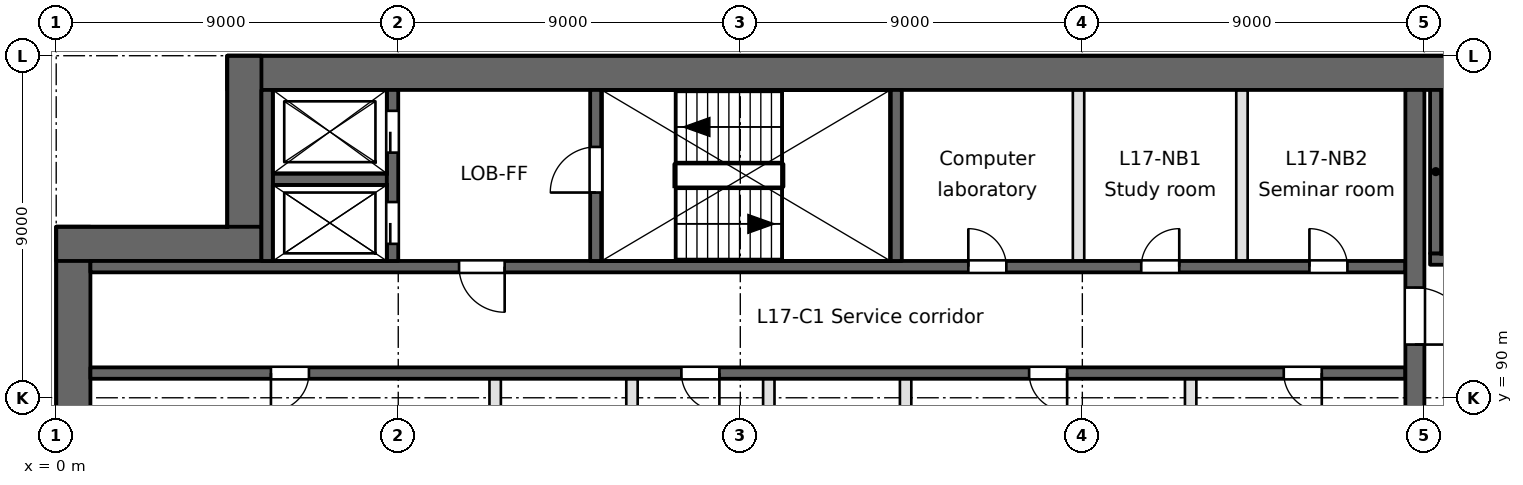
"""IFC4 building model, lengths in metres.
Left out: names, types, materials, properties, quantities, classifications, styles, units other than length and angle.
Written with IfcOpenShell. Run it as: python <this file> out.ifc"""

import sys

from ifc_helpers import new_model, si_unit, direction, frame, frame_2d, origin, place, context, subcontext, project, spatial, rectangle, extrude, element, fill, save


model = new_model("IFC4")
c1 = context("Model", 3, precision=1e-05, world=origin(), true_north=direction((0.0, 1.0)))
c2 = subcontext(c1, "Body", "Model", "MODEL_VIEW")
j1 = project(units=[si_unit("LENGTHUNIT", "METRE"), si_unit("PLANEANGLEUNIT", "RADIAN")], contexts=[c1])
p1 = place(None, origin())
s1 = spatial("IfcSite", under=j1, at=p1, CompositionType="ELEMENT")
p2 = place(p1, origin())
s2 = spatial("IfcBuilding", under=s1, at=p2, CompositionType="ELEMENT")
p3 = place(p2, frame((0.0, 0.0, 72.8)))
s3 = spatial("IfcBuildingStorey", under=s2, at=p3, CompositionType="ELEMENT", Elevation=72.8)
p4 = place(p3, frame((0.45, 94.5, 0.0), z_axis=(0.0, 0.0, 1.0), x_axis=(0.0, -1.0, 0.0)))
e1 = element("IfcWall", 1, at=p4, inside=s3, PredefinedType="SHEAR", context=c2, shape_type="SweptSolid", body=[
    extrude(rectangle(XDim=66.187, YDim=0.9, at=frame_2d((33.094, 0.0))), origin(), (0.0, 0.0, 1.0), 3.7),
])
p5 = place(p3, frame((94.5, 98.55, 0.0), z_axis=(0.0, 0.0, 1.0), x_axis=(-1.0, 0.0, 0.0)))
e2 = element("IfcWall", 2, at=p5, inside=s3, PredefinedType="SHEAR", context=c2, shape_type="SweptSolid", body=[
    extrude(rectangle(XDim=90.0, YDim=0.9, at=frame_2d((45.0, 0.0))), origin(), (0.0, 0.0, 1.0), 3.7),
])
for number, where, z_axis, x_axis in (
    (3, (4.95, 99.0, 0.0), (0.0, 0.0, 1.0), (0.0, -1.0, 0.0)),
    (4, (5.4, 94.05, 0.0), (0.0, 0.0, 1.0), (-1.0, 0.0, 0.0)),
):
    element("IfcWall", number, at=place(p3, frame(where, z_axis=z_axis, x_axis=x_axis)), inside=s3, PredefinedType="SHEAR", context=c2, shape_type="SweptSolid", body=[
        extrude(rectangle(XDim=5.4, YDim=0.9, at=frame_2d((2.7, 0.0))), origin(), (0.0, 0.0, 1.0), 3.7),
    ])
p6 = place(p3, frame((0.9, 90.65, -0.4), z_axis=(0.0, 0.0, 1.0), x_axis=(1.0, 0.0, 0.0)))
e5 = element("IfcWall", 5, at=p6, inside=s3, PredefinedType="SOLIDWALL", context=c2, shape_type="SweptSolid", body=[
    extrude(rectangle(XDim=34.6, YDim=0.3, at=frame_2d((17.3, 0.0))), origin(), (0.0, 0.0, 1.0), 3.7),
])
p7 = place(p6, frame((4.75, 0.0, 0.4)))
e6 = element("IfcOpeningElement", 6, at=p7, cuts=e5, PredefinedType="OPENING", context=c2, shape_type="SweptSolid", body=[
    extrude(rectangle(XDim=1.0, YDim=2.1, at=frame_2d((0.5, 1.05))), frame((0.0, 0.15, 0.0), z_axis=(0.0, -1.0, 0.0), x_axis=(1.0, 0.0, 0.0)), (0.0, 0.0, 1.0), 0.3),
])
p8 = place(p6, frame((24.7, 0.0, 0.4)))
e7 = element("IfcOpeningElement", 7, at=p8, cuts=e5, PredefinedType="OPENING", context=c2, shape_type="SweptSolid", body=[
    extrude(rectangle(XDim=1.0, YDim=2.1, at=frame_2d((0.5, 1.05))), frame((0.0, 0.15, 0.0), z_axis=(0.0, -1.0, 0.0), x_axis=(1.0, 0.0, 0.0)), (0.0, 0.0, 1.0), 0.3),
])
p9 = place(p6, frame((15.55, 0.0, 0.4)))
e8 = element("IfcOpeningElement", 8, at=p9, cuts=e5, PredefinedType="OPENING", context=c2, shape_type="SweptSolid", body=[
    extrude(rectangle(XDim=1.0, YDim=2.1, at=frame_2d((0.5, 1.05))), frame((0.0, 0.15, 0.0), z_axis=(0.0, -1.0, 0.0), x_axis=(1.0, 0.0, 0.0)), (0.0, 0.0, 1.0), 0.3),
])
p10 = place(p6, frame((31.4, 0.0, 0.4)))
e9 = element("IfcOpeningElement", 9, at=p10, cuts=e5, PredefinedType="OPENING", context=c2, shape_type="SweptSolid", body=[
    extrude(rectangle(XDim=1.0, YDim=2.1, at=frame_2d((0.5, 1.05))), frame((0.0, 0.15, 0.0), z_axis=(0.0, -1.0, 0.0), x_axis=(1.0, 0.0, 0.0)), (0.0, 0.0, 1.0), 0.3),
])
p11 = place(p3, frame((0.9, 93.45, -0.4), z_axis=(0.0, 0.0, 1.0), x_axis=(1.0, 0.0, 0.0)))
e10 = element("IfcWall", 10, at=p11, inside=s3, PredefinedType="SOLIDWALL", context=c2, shape_type="SweptSolid", body=[
    extrude(rectangle(XDim=34.6, YDim=0.3, at=frame_2d((17.3, 0.0))), origin(), (0.0, 0.0, 1.0), 3.7),
])
p12 = place(p11, frame((9.7, 0.0, 0.4)))
e11 = element("IfcOpeningElement", 11, at=p12, cuts=e10, PredefinedType="OPENING", context=c2, shape_type="SweptSolid", body=[
    extrude(rectangle(XDim=1.2, YDim=2.1, at=frame_2d((0.6, 1.05))), frame((0.0, 0.15, 0.0), z_axis=(0.0, -1.0, 0.0), x_axis=(1.0, 0.0, 0.0)), (0.0, 0.0, 1.0), 0.3),
])
p13 = place(p11, frame((23.1, 0.0, 0.4)))
e12 = element("IfcOpeningElement", 12, at=p13, cuts=e10, PredefinedType="OPENING", context=c2, shape_type="SweptSolid", body=[
    extrude(rectangle(XDim=1.0, YDim=2.1, at=frame_2d((0.5, 1.05))), frame((0.0, 0.15, 0.0), z_axis=(0.0, -1.0, 0.0), x_axis=(1.0, 0.0, 0.0)), (0.0, 0.0, 1.0), 0.3),
])
p14 = place(p11, frame((27.65, 0.0, 0.4)))
e13 = element("IfcOpeningElement", 13, at=p14, cuts=e10, PredefinedType="OPENING", context=c2, shape_type="SweptSolid", body=[
    extrude(rectangle(XDim=1.0, YDim=2.1, at=frame_2d((0.5, 1.05))), frame((0.0, 0.15, 0.0), z_axis=(0.0, -1.0, 0.0), x_axis=(1.0, 0.0, 0.0)), (0.0, 0.0, 1.0), 0.3),
])
p15 = place(p11, frame((32.075, 0.0, 0.4)))
e14 = element("IfcOpeningElement", 14, at=p15, cuts=e10, PredefinedType="OPENING", context=c2, shape_type="SweptSolid", body=[
    extrude(rectangle(XDim=1.0, YDim=2.1, at=frame_2d((0.5, 1.05))), frame((0.0, 0.15, 0.0), z_axis=(0.0, -1.0, 0.0), x_axis=(1.0, 0.0, 0.0)), (0.0, 0.0, 1.0), 0.3),
])
p16 = place(p3, frame((36.15, 93.65, -0.4), z_axis=(0.0, 0.0, 1.0), x_axis=(1.0, 0.0, 0.0)))
e15 = element("IfcWall", 15, at=p16, inside=s3, PredefinedType="SOLIDWALL", context=c2, shape_type="SweptSolid", body=[
    extrude(rectangle(XDim=8.2, YDim=0.3, at=frame_2d((4.1, 0.0))), origin(), (0.0, 0.0, 1.0), 3.7),
])
p17 = place(p16, frame((0.7, 0.0, 0.4)))
e16 = element("IfcOpeningElement", 16, at=p17, cuts=e15, PredefinedType="OPENING", context=c2, shape_type="SweptSolid", body=[
    extrude(rectangle(XDim=1.2, YDim=2.1, at=frame_2d((0.6, 1.05))), frame((0.0, 0.15, 0.0), z_axis=(0.0, -1.0, 0.0), x_axis=(1.0, 0.0, 0.0)), (0.0, 0.0, 1.0), 0.3),
])
p18 = place(p3, frame((5.7, 95.75, -0.4), z_axis=(0.0, 0.0, 1.0), x_axis=(1.0, 0.0, 0.0)))
e17 = element("IfcWall", 17, at=p18, inside=s3, PredefinedType="SOLIDWALL", context=c2, shape_type="SweptSolid", body=[
    extrude(rectangle(XDim=3.0, YDim=0.3, at=frame_2d((1.5, 0.0))), origin(), (0.0, 0.0, 1.0), 3.7),
])
p19 = place(p3, frame((5.55, 93.6, -0.4), z_axis=(0.0, 0.0, 1.0), x_axis=(0.0, 1.0, 0.0)))
e18 = element("IfcWall", 18, at=p19, inside=s3, PredefinedType="SOLIDWALL", context=c2, shape_type="SweptSolid", body=[
    extrude(rectangle(XDim=4.5, YDim=0.3, at=frame_2d((2.25, 0.0))), origin(), (0.0, 0.0, 1.0), 3.7),
])
p20 = place(p3, frame((8.85, 93.6, -0.4), z_axis=(0.0, 0.0, 1.0), x_axis=(0.0, 1.0, 0.0)))
e19 = element("IfcWall", 19, at=p20, inside=s3, PredefinedType="SOLIDWALL", context=c2, shape_type="SweptSolid", body=[
    extrude(rectangle(XDim=4.5, YDim=0.3, at=frame_2d((2.25, 0.0))), origin(), (0.0, 0.0, 1.0), 3.7),
])
p21 = place(p20, frame((0.45, 0.0, 0.4)))
e20 = element("IfcOpeningElement", 20, at=p21, cuts=e19, PredefinedType="OPENING", context=c2, shape_type="SweptSolid", body=[
    extrude(rectangle(XDim=1.1, YDim=2.1, at=frame_2d((0.55, 1.05))), frame((0.0, 0.15, 0.0), z_axis=(0.0, -1.0, 0.0), x_axis=(1.0, 0.0, 0.0)), (0.0, 0.0, 1.0), 0.3),
])
p22 = place(p20, frame((2.85, 0.0, 0.4)))
e21 = element("IfcOpeningElement", 21, at=p22, cuts=e19, PredefinedType="OPENING", context=c2, shape_type="SweptSolid", body=[
    extrude(rectangle(XDim=1.1, YDim=2.1, at=frame_2d((0.55, 1.05))), frame((0.0, 0.15, 0.0), z_axis=(0.0, -1.0, 0.0), x_axis=(1.0, 0.0, 0.0)), (0.0, 0.0, 1.0), 0.3),
])
p23 = place(p3, frame((11.55, 87.95, 0.0), z_axis=(0.0, 0.0, 1.0), x_axis=(0.0, 1.0, 0.0)))
e22 = element("IfcWall", 22, at=p23, inside=s3, PredefinedType="PARTITIONING", context=c2, shape_type="SweptSolid", body=[
    extrude(rectangle(XDim=2.55, YDim=0.3, at=frame_2d((1.275, 0.0))), origin(), (0.0, 0.0, 1.0), 3.3),
])
p24 = place(p3, frame((14.2, 93.6, -0.4), z_axis=(0.0, 0.0, 1.0), x_axis=(0.0, 1.0, 0.0)))
e23 = element("IfcWall", 23, at=p24, inside=s3, PredefinedType="SOLIDWALL", context=c2, shape_type="SweptSolid", body=[
    extrude(rectangle(XDim=4.5, YDim=0.3, at=frame_2d((2.25, 0.0))), origin(), (0.0, 0.0, 1.0), 3.7),
])
p25 = place(p24, frame((1.8, 0.0, 0.4)))
e24 = element("IfcOpeningElement", 24, at=p25, cuts=e23, PredefinedType="OPENING", context=c2, shape_type="SweptSolid", body=[
    extrude(rectangle(XDim=1.2, YDim=2.1, at=frame_2d((0.6, 1.05))), frame((0.0, 0.15, 0.0), z_axis=(0.0, -1.0, 0.0), x_axis=(1.0, 0.0, 0.0)), (0.0, 0.0, 1.0), 0.3),
])
for number, where, z_axis, x_axis in (
    (25, (15.15, 77.55, 0.0), (0.0, 0.0, 1.0), (0.0, 1.0, 0.0)),
    (26, (18.75, 77.55, 0.0), (0.0, 0.0, 1.0), (0.0, 1.0, 0.0)),
):
    element("IfcWall", number, at=place(p3, frame(where, z_axis=z_axis, x_axis=x_axis)), inside=s3, PredefinedType="PARTITIONING", context=c2, shape_type="SweptSolid", body=[
        extrude(rectangle(XDim=12.95, YDim=0.3, at=frame_2d((6.475, 0.0))), origin(), (0.0, 0.0, 1.0), 3.3),
    ])
p26 = place(p3, frame((22.1, 93.6, -0.4), z_axis=(0.0, 0.0, 1.0), x_axis=(0.0, 1.0, 0.0)))
e27 = element("IfcWall", 27, at=p26, inside=s3, PredefinedType="SOLIDWALL", context=c2, shape_type="SweptSolid", body=[
    extrude(rectangle(XDim=4.5, YDim=0.3, at=frame_2d((2.25, 0.0))), origin(), (0.0, 0.0, 1.0), 3.7),
])
p27 = place(p3, frame((22.35, 87.95, 0.0), z_axis=(0.0, 0.0, 1.0), x_axis=(0.0, 1.0, 0.0)))
e28 = element("IfcWall", 28, at=p27, inside=s3, PredefinedType="PARTITIONING", context=c2, shape_type="SweptSolid", body=[
    extrude(rectangle(XDim=2.55, YDim=0.3, at=frame_2d((1.275, 0.0))), origin(), (0.0, 0.0, 1.0), 3.3),
])
p28 = place(p3, frame((26.9, 93.6, 0.0), z_axis=(0.0, 0.0, 1.0), x_axis=(0.0, 1.0, 0.0)))
e29 = element("IfcWall", 29, at=p28, inside=s3, PredefinedType="PARTITIONING", context=c2, shape_type="SweptSolid", body=[
    extrude(rectangle(XDim=4.5, YDim=0.3, at=frame_2d((2.25, 0.0))), origin(), (0.0, 0.0, 1.0), 3.3),
])
p29 = place(p3, frame((29.85, 87.95, 0.0), z_axis=(0.0, 0.0, 1.0), x_axis=(0.0, 1.0, 0.0)))
e30 = element("IfcWall", 30, at=p29, inside=s3, PredefinedType="PARTITIONING", context=c2, shape_type="SweptSolid", body=[
    extrude(rectangle(XDim=2.55, YDim=0.3, at=frame_2d((1.275, 0.0))), origin(), (0.0, 0.0, 1.0), 3.3),
])
p30 = place(p3, frame((31.2, 93.6, 0.0), z_axis=(0.0, 0.0, 1.0), x_axis=(0.0, 1.0, 0.0)))
e31 = element("IfcWall", 31, at=p30, inside=s3, PredefinedType="PARTITIONING", context=c2, shape_type="SweptSolid", body=[
    extrude(rectangle(XDim=4.5, YDim=0.3, at=frame_2d((2.25, 0.0))), origin(), (0.0, 0.0, 1.0), 3.3),
])
p31 = place(p3, frame((35.75, 63.5, -0.4), z_axis=(0.0, 0.0, 1.0), x_axis=(0.0, 1.0, 0.0)))
e32 = element("IfcWall", 32, at=p31, inside=s3, PredefinedType="SOLIDWALL", context=c2, shape_type="SweptSolid", body=[
    extrude(rectangle(XDim=34.6, YDim=0.5, at=frame_2d((17.3, 0.0))), origin(), (0.0, 0.0, 1.0), 3.7),
])
p32 = place(p31, frame((9.7, 0.0, 0.4)))
e33 = element("IfcOpeningElement", 33, at=p32, cuts=e32, PredefinedType="OPENING", context=c2, shape_type="SweptSolid", body=[
    extrude(rectangle(XDim=2.4, YDim=2.1, at=frame_2d((1.2, 1.05))), frame((0.0, 0.25, 0.0), z_axis=(0.0, -1.0, 0.0), x_axis=(1.0, 0.0, 0.0)), (0.0, 0.0, 1.0), 0.5),
])
p33 = place(p31, frame((27.9, 0.0, 0.4)))
e34 = element("IfcOpeningElement", 34, at=p33, cuts=e32, PredefinedType="OPENING", context=c2, shape_type="SweptSolid", body=[
    extrude(rectangle(XDim=1.5, YDim=2.1, at=frame_2d((0.75, 1.05))), frame((0.0, 0.25, 0.0), z_axis=(0.0, -1.0, 0.0), x_axis=(1.0, 0.0, 0.0)), (0.0, 0.0, 1.0), 0.5),
])
p34 = place(p31, frame((1.5, 0.0, 0.4)))
e35 = element("IfcOpeningElement", 35, at=p34, cuts=e32, PredefinedType="OPENING", context=c2, shape_type="SweptSolid", body=[
    extrude(rectangle(XDim=1.2, YDim=2.1, at=frame_2d((0.6, 1.05))), frame((0.0, 0.25, 0.0), z_axis=(0.0, -1.0, 0.0), x_axis=(1.0, 0.0, 0.0)), (0.0, 0.0, 1.0), 0.5),
])
p35 = place(p3, frame((36.3, 93.8, -0.4), z_axis=(0.0, 0.0, 1.0), x_axis=(0.0, 1.0, 0.0)))
e36 = element("IfcWall", 36, at=p35, inside=s3, PredefinedType="SOLIDWALL", context=c2, shape_type="SweptSolid", body=[
    extrude(rectangle(XDim=4.3, YDim=0.3, at=frame_2d((2.15, 0.0))), origin(), (0.0, 0.0, 1.0), 3.7),
])
p36 = place(p21, origin())
e37 = element("IfcDoor", 37, at=p36, inside=s3, OperationType="SLIDING_TO_RIGHT", PredefinedType="DOOR", context=c2, shape_type="SweptSolid", body=[
    extrude(rectangle(XDim=1.1, YDim=2.1, at=frame_2d((0.55, 1.05))), frame((0.0, 0.025, 0.0), z_axis=(0.0, -1.0, 0.0), x_axis=(1.0, 0.0, 0.0)), (0.0, 0.0, 1.0), 0.05),
])
fill(e20, e37)
p37 = place(p22, origin())
e38 = element("IfcDoor", 38, at=p37, inside=s3, OperationType="SLIDING_TO_LEFT", PredefinedType="DOOR", context=c2, shape_type="SweptSolid", body=[
    extrude(rectangle(XDim=1.1, YDim=2.1, at=frame_2d((0.55, 1.05))), frame((0.0, 0.025, 0.0), z_axis=(0.0, -1.0, 0.0), x_axis=(1.0, 0.0, 0.0)), (0.0, 0.0, 1.0), 0.05),
])
fill(e21, e38)
p38 = place(p12, frame((1.2, 0.0, 0.0), z_axis=(0.0, 0.0, 1.0), x_axis=(-1.0, 0.0, 0.0)))
e39 = element("IfcDoor", 39, at=p38, inside=s3, OperationType="SINGLE_SWING_LEFT", PredefinedType="DOOR", context=c2, shape_type="SweptSolid", body=[
    extrude(rectangle(XDim=1.2, YDim=2.1, at=frame_2d((0.6, 1.05))), frame((0.0, 0.025, 0.0), z_axis=(0.0, -1.0, 0.0), x_axis=(1.0, 0.0, 0.0)), (0.0, 0.0, 1.0), 0.05),
])
fill(e11, e39)
p39 = place(p33, frame((1.5, 0.0, 0.0), z_axis=(0.0, 0.0, 1.0), x_axis=(-1.0, 0.0, 0.0)))
e40 = element("IfcDoor", 40, at=p39, inside=s3, OperationType="SINGLE_SWING_RIGHT", PredefinedType="DOOR", context=c2, shape_type="SweptSolid", body=[
    extrude(rectangle(XDim=1.5, YDim=2.1, at=frame_2d((0.75, 1.05))), frame((0.0, 0.025, 0.0), z_axis=(0.0, -1.0, 0.0), x_axis=(1.0, 0.0, 0.0)), (0.0, 0.0, 1.0), 0.05),
])
fill(e34, e40)
p40 = place(p25, origin())
e41 = element("IfcDoor", 41, at=p40, inside=s3, OperationType="SINGLE_SWING_LEFT", PredefinedType="DOOR", context=c2, shape_type="SweptSolid", body=[
    extrude(rectangle(XDim=1.2, YDim=2.1, at=frame_2d((0.6, 1.05))), frame((0.0, 0.025, 0.0), z_axis=(0.0, -1.0, 0.0), x_axis=(1.0, 0.0, 0.0)), (0.0, 0.0, 1.0), 0.05),
])
fill(e24, e41)
p41 = place(p7, frame((1.0, 0.0, 0.0), z_axis=(0.0, 0.0, 1.0), x_axis=(-1.0, 0.0, 0.0)))
e42 = element("IfcDoor", 42, at=p41, inside=s3, OperationType="SINGLE_SWING_RIGHT", PredefinedType="DOOR", context=c2, shape_type="SweptSolid", body=[
    extrude(rectangle(XDim=1.0, YDim=2.1, at=frame_2d((0.5, 1.05))), frame((0.0, 0.025, 0.0), z_axis=(0.0, -1.0, 0.0), x_axis=(1.0, 0.0, 0.0)), (0.0, 0.0, 1.0), 0.05),
])
fill(e6, e42)
p42 = place(p8, frame((1.0, 0.0, 0.0), z_axis=(0.0, 0.0, 1.0), x_axis=(-1.0, 0.0, 0.0)))
e43 = element("IfcDoor", 43, at=p42, inside=s3, OperationType="SINGLE_SWING_LEFT", PredefinedType="DOOR", context=c2, shape_type="SweptSolid", body=[
    extrude(rectangle(XDim=1.0, YDim=2.1, at=frame_2d((0.5, 1.05))), frame((0.0, 0.025, 0.0), z_axis=(0.0, -1.0, 0.0), x_axis=(1.0, 0.0, 0.0)), (0.0, 0.0, 1.0), 0.05),
])
fill(e7, e43)
p43 = place(p9, frame((1.0, 0.0, 0.0), z_axis=(0.0, 0.0, 1.0), x_axis=(-1.0, 0.0, 0.0)))
e44 = element("IfcDoor", 44, at=p43, inside=s3, OperationType="SINGLE_SWING_LEFT", PredefinedType="DOOR", context=c2, shape_type="SweptSolid", body=[
    extrude(rectangle(XDim=1.0, YDim=2.1, at=frame_2d((0.5, 1.05))), frame((0.0, 0.025, 0.0), z_axis=(0.0, -1.0, 0.0), x_axis=(1.0, 0.0, 0.0)), (0.0, 0.0, 1.0), 0.05),
])
fill(e8, e44)
p44 = place(p10, frame((1.0, 0.0, 0.0), z_axis=(0.0, 0.0, 1.0), x_axis=(-1.0, 0.0, 0.0)))
e45 = element("IfcDoor", 45, at=p44, inside=s3, OperationType="SINGLE_SWING_LEFT", PredefinedType="DOOR", context=c2, shape_type="SweptSolid", body=[
    extrude(rectangle(XDim=1.0, YDim=2.1, at=frame_2d((0.5, 1.05))), frame((0.0, 0.025, 0.0), z_axis=(0.0, -1.0, 0.0), x_axis=(1.0, 0.0, 0.0)), (0.0, 0.0, 1.0), 0.05),
])
fill(e9, e45)
p45 = place(p13, origin())
e46 = element("IfcDoor", 46, at=p45, inside=s3, OperationType="SINGLE_SWING_LEFT", PredefinedType="DOOR", context=c2, shape_type="SweptSolid", body=[
    extrude(rectangle(XDim=1.0, YDim=2.1, at=frame_2d((0.5, 1.05))), frame((0.0, 0.025, 0.0), z_axis=(0.0, -1.0, 0.0), x_axis=(1.0, 0.0, 0.0)), (0.0, 0.0, 1.0), 0.05),
])
fill(e12, e46)
p46 = place(p14, origin())
e47 = element("IfcDoor", 47, at=p46, inside=s3, OperationType="SINGLE_SWING_RIGHT", PredefinedType="DOOR", context=c2, shape_type="SweptSolid", body=[
    extrude(rectangle(XDim=1.0, YDim=2.1, at=frame_2d((0.5, 1.05))), frame((0.0, 0.025, 0.0), z_axis=(0.0, -1.0, 0.0), x_axis=(1.0, 0.0, 0.0)), (0.0, 0.0, 1.0), 0.05),
])
fill(e13, e47)
p47 = place(p15, origin())
e48 = element("IfcDoor", 48, at=p47, inside=s3, OperationType="SINGLE_SWING_LEFT", PredefinedType="DOOR", context=c2, shape_type="SweptSolid", body=[
    extrude(rectangle(XDim=1.0, YDim=2.1, at=frame_2d((0.5, 1.05))), frame((0.0, 0.025, 0.0), z_axis=(0.0, -1.0, 0.0), x_axis=(1.0, 0.0, 0.0)), (0.0, 0.0, 1.0), 0.05),
])
fill(e14, e48)
save(model, sys.argv[1])
